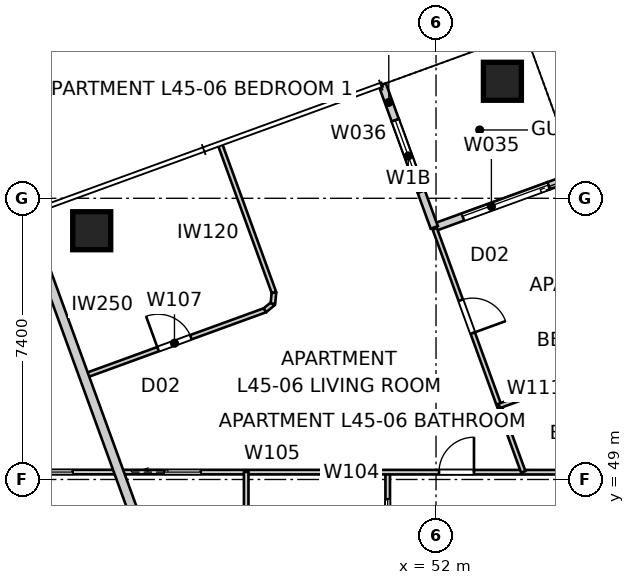
"""IFC4 building model, lengths in metres.
Left out: names, types, materials, properties, quantities, classifications, styles, units other than length and angle.
Written with IfcOpenShell. Run it as: python <this file> out.ifc"""

import sys

from ifc_helpers import new_model, si_unit, direction, frame, frame_2d, origin, origin_2d, place, context, subcontext, project, spatial, rectangle, extrude, element, fill, save


model = new_model("IFC4")
c1 = context("Model", 3, precision=1e-05, world=origin(), true_north=direction((0.0, 1.0)))
c2 = subcontext(c1, "Body", "Model", "MODEL_VIEW")
j1 = project(units=[si_unit("LENGTHUNIT", "METRE"), si_unit("PLANEANGLEUNIT", "RADIAN")], contexts=[c1])
p1 = place(None, origin())
s1 = spatial("IfcSite", under=j1, at=p1, CompositionType="ELEMENT")
p2 = place(p1, origin())
s2 = spatial("IfcBuilding", under=s1, at=p2, CompositionType="ELEMENT")
p3 = place(p2, frame((0.0, 0.0, 164.2)))
s3 = spatial("IfcBuildingStorey", under=s2, at=p3, CompositionType="ELEMENT", Elevation=164.2)
for number, where, z_axis, x_axis in (
    (1, (53.747, 59.479, 0.0), (0.0, 0.0, 1.0), (1.0, 0.0, 0.0)),
    (2, (42.94, 55.546, 0.0), (0.0, 0.0, 1.0), (1.0, 0.0, 0.0)),
):
    element("IfcColumn", number, at=place(p3, frame(where, z_axis=z_axis, x_axis=x_axis)), inside=s3, PredefinedType="COLUMN", context=c2, shape_type="SweptSolid", body=[
        extrude(rectangle(XDim=1.0, YDim=1.0, at=origin_2d()), origin(), (0.0, 0.0, 1.0), 3.4),
    ])
p4 = place(p3, frame((55.712, 57.002, 0.0), z_axis=(0.0, 0.0, 1.0), x_axis=(-0.939659694648, -0.342110593602, 0.0)))
e3 = element("IfcWall", 3, at=p4, inside=s3, PredefinedType="SOLIDWALL", context=c2, shape_type="SweptSolid", body=[
    extrude(rectangle(XDim=0.8, YDim=0.2, at=frame_2d((0.4, 0.0))), origin(), (0.0, 0.0, 1.0), 3.25),
])
p5 = place(p3, frame((54.96, 56.729, 0.0), z_axis=(0.0, 0.0, 1.0), x_axis=(-0.939693144909, -0.342018703306, 0.0)))
e4 = element("IfcWall", 4, at=p5, inside=s3, PredefinedType="SOLIDWALL", context=c2, shape_type="SweptSolid", body=[
    extrude(rectangle(XDim=3.2, YDim=0.2, at=frame_2d((1.6, 0.0))), origin(), (0.0, 0.0, 1.0), 2.722),
])
p6 = place(p5, origin())
e5 = element("IfcOpeningElement", 5, at=p6, cuts=e4, PredefinedType="OPENING", context=c2, shape_type="SweptSolid", body=[
    extrude(rectangle(XDim=2.4, YDim=2.1, at=frame_2d((1.2, 1.05))), frame((0.0, 0.11, 0.0), z_axis=(0.0, -1.0, 0.0), x_axis=(1.0, 0.0, 0.0)), (0.0, 0.0, 1.0), 0.22),
])
p7 = place(p3, frame((51.953, 55.634, 0.0), z_axis=(0.0, 0.0, 1.0), x_axis=(-0.341965219194, 0.939712609717, 0.0)))
e6 = element("IfcWall", 6, at=p7, inside=s3, PredefinedType="SOLIDWALL", context=c2, shape_type="SweptSolid", body=[
    extrude(rectangle(XDim=3.0, YDim=0.2, at=frame_2d((1.5, 0.0))), origin(), (0.0, 0.0, 1.0), 2.722),
])
p8 = place(p7, frame((1.0, 0.0, 0.45)))
e7 = element("IfcOpeningElement", 7, at=p8, cuts=e6, PredefinedType="OPENING", context=c2, shape_type="SweptSolid", body=[
    extrude(rectangle(XDim=2.0, YDim=1.8, at=frame_2d((1.0, 0.9))), frame((0.0, 0.11, 0.0), z_axis=(0.0, -1.0, 0.0), x_axis=(1.0, 0.0, 0.0)), (0.0, 0.0, 1.0), 0.22),
])
p9 = place(p3, frame((50.927, 58.453, 0.0), z_axis=(0.0, 0.0, 1.0), x_axis=(-0.342037080957, 0.939686455819, 0.0)))
e8 = element("IfcWall", 8, at=p9, inside=s3, PredefinedType="SOLIDWALL", context=c2, shape_type="SweptSolid", body=[
    extrude(rectangle(XDim=1.0, YDim=0.2, at=frame_2d((0.5, 0.0))), origin(), (0.0, 0.0, 1.0), 3.25),
])
p10 = place(p3, frame((41.188, 55.973, 0.0), z_axis=(0.0, 0.0, 1.0), x_axis=(0.342010282049, -0.939696209938, 0.0)))
e9 = element("IfcWall", 9, at=p10, inside=s3, PredefinedType="PARTITIONING", context=c2, shape_type="SweptSolid", body=[
    extrude(rectangle(XDim=9.756, YDim=0.25, at=frame_2d((4.878, 0.0))), origin(), (0.0, 0.0, 1.0), 3.25),
])
p11 = place(p3, frame((50.729, 46.8, 0.0), z_axis=(0.0, 0.0, 1.0), x_axis=(0.0, 1.0, 0.0)))
e10 = element("IfcWall", 10, at=p11, inside=s3, PredefinedType="PARTITIONING", context=c2, shape_type="SweptSolid", body=[
    extrude(rectangle(XDim=2.4, YDim=0.12, at=frame_2d((1.2, 0.0))), origin(), (0.0, 0.0, 1.0), 3.25),
])
p12 = place(p11, frame((0.72, 0.0, 0.0)))
e11 = element("IfcOpeningElement", 11, at=p12, cuts=e10, PredefinedType="OPENING", context=c2, shape_type="SweptSolid", body=[
    extrude(rectangle(XDim=0.96, YDim=2.1, at=frame_2d((0.48, 1.05))), frame((0.0, 0.07, 0.0), z_axis=(0.0, -1.0, 0.0), x_axis=(1.0, 0.0, 0.0)), (0.0, 0.0, 1.0), 0.14),
])
p13 = place(p3, frame((27.691, 49.2, 0.0), z_axis=(0.0, 0.0, 1.0), x_axis=(0.999999952285, -0.000308918217, 0.0)))
e12 = element("IfcWall", 12, at=p13, inside=s3, PredefinedType="PARTITIONING", context=c2, shape_type="SweptSolid", body=[
    extrude(rectangle(XDim=30.822, YDim=0.12, at=frame_2d((15.411, 0.0))), origin(), (0.0, 0.0, 1.0), 3.25),
])
p14 = place(p13, frame((5.882, 0.0, 0.0)))
e13 = element("IfcOpeningElement", 13, at=p14, cuts=e12, PredefinedType="OPENING", context=c2, shape_type="SweptSolid", body=[
    extrude(rectangle(XDim=0.92, YDim=2.34, at=frame_2d((0.46, 1.17))), frame((0.0, 0.07, 0.0), z_axis=(0.0, -1.0, 0.0), x_axis=(1.0, 0.0, 0.0)), (0.0, 0.0, 1.0), 0.14),
])
p15 = place(p13, frame((28.07, 0.0, 0.0)))
e14 = element("IfcOpeningElement", 14, at=p15, cuts=e12, PredefinedType="OPENING", context=c2, shape_type="SweptSolid", body=[
    extrude(rectangle(XDim=0.92, YDim=2.34, at=frame_2d((0.46, 1.17))), frame((0.0, 0.07, 0.0), z_axis=(0.0, -1.0, 0.0), x_axis=(1.0, 0.0, 0.0)), (0.0, 0.0, 1.0), 0.14),
])
p16 = place(p13, frame((24.388, 0.0, 0.0)))
e15 = element("IfcOpeningElement", 15, at=p16, cuts=e12, PredefinedType="OPENING", context=c2, shape_type="SweptSolid", body=[
    extrude(rectangle(XDim=0.92, YDim=2.34, at=frame_2d((0.46, 1.17))), frame((0.0, 0.07, 0.0), z_axis=(0.0, -1.0, 0.0), x_axis=(1.0, 0.0, 0.0)), (0.0, 0.0, 1.0), 0.14),
])
p17 = place(p13, frame((1.506, 0.0, 0.0)))
e16 = element("IfcOpeningElement", 16, at=p17, cuts=e12, PredefinedType="OPENING", context=c2, shape_type="SweptSolid", body=[
    extrude(rectangle(XDim=0.96, YDim=2.1, at=frame_2d((0.48, 1.05))), frame((0.0, 0.07, 0.0), z_axis=(0.0, -1.0, 0.0), x_axis=(1.0, 0.0, 0.0)), (0.0, 0.0, 1.0), 0.14),
])
p18 = place(p13, frame((17.158, 0.0, 0.0)))
e17 = element("IfcOpeningElement", 17, at=p18, cuts=e12, PredefinedType="OPENING", context=c2, shape_type="SweptSolid", body=[
    extrude(rectangle(XDim=0.96, YDim=2.1, at=frame_2d((0.48, 1.05))), frame((0.0, 0.07, 0.0), z_axis=(0.0, -1.0, 0.0), x_axis=(1.0, 0.0, 0.0)), (0.0, 0.0, 1.0), 0.14),
])
p19 = place(p13, frame((9.026, 0.0, 0.0)))
e18 = element("IfcOpeningElement", 18, at=p19, cuts=e12, PredefinedType="OPENING", context=c2, shape_type="SweptSolid", body=[
    extrude(rectangle(XDim=0.96, YDim=2.1, at=frame_2d((0.48, 1.05))), frame((0.0, 0.07, 0.0), z_axis=(0.0, -1.0, 0.0), x_axis=(1.0, 0.0, 0.0)), (0.0, 0.0, 1.0), 0.14),
])
p20 = place(p13, frame((13.788, 0.0, 0.0)))
e19 = element("IfcOpeningElement", 19, at=p20, cuts=e12, PredefinedType="OPENING", context=c2, shape_type="SweptSolid", body=[
    extrude(rectangle(XDim=0.96, YDim=2.1, at=frame_2d((0.48, 1.05))), frame((0.0, 0.07, 0.0), z_axis=(0.0, -1.0, 0.0), x_axis=(1.0, 0.0, 0.0)), (0.0, 0.0, 1.0), 0.14),
])
p21 = place(p3, frame((47.005, 46.8, 0.0), z_axis=(0.0, 0.0, 1.0), x_axis=(0.0, 1.0, 0.0)))
e20 = element("IfcWall", 20, at=p21, inside=s3, PredefinedType="PARTITIONING", context=c2, shape_type="SweptSolid", body=[
    extrude(rectangle(XDim=2.4, YDim=0.12, at=frame_2d((1.2, 0.0))), origin(), (0.0, 0.0, 1.0), 3.25),
])
p22 = place(p3, frame((42.736, 51.72, 0.0), z_axis=(0.0, 0.0, 1.0), x_axis=(0.939707596988, 0.341978993747, 0.0)))
e21 = element("IfcWall", 21, at=p22, inside=s3, PredefinedType="PARTITIONING", context=c2, shape_type="SweptSolid", body=[
    extrude(rectangle(XDim=5.068, YDim=0.12, at=frame_2d((2.534, 0.0))), origin(), (0.0, 0.0, 1.0), 3.25),
])
p23 = place(p22, frame((2.074, 0.0, 0.0)))
e22 = element("IfcOpeningElement", 22, at=p23, cuts=e21, PredefinedType="OPENING", context=c2, shape_type="SweptSolid", body=[
    extrude(rectangle(XDim=0.92, YDim=2.34, at=frame_2d((0.46, 1.17))), frame((0.0, 0.07, 0.0), z_axis=(0.0, -1.0, 0.0), x_axis=(1.0, 0.0, 0.0)), (0.0, 0.0, 1.0), 0.14),
])
p24 = place(p3, frame((47.499, 53.453, 0.0), z_axis=(0.0, 0.0, 1.0), x_axis=(0.769326440299, 0.638855874401, 0.0)))
e23 = element("IfcWall", 23, at=p24, inside=s3, PredefinedType="PARTITIONING", context=c2, shape_type="SweptSolid", body=[
    extrude(rectangle(XDim=0.271, YDim=0.12, at=frame_2d((0.136, 0.0))), origin(), (0.0, 0.0, 1.0), 3.25),
])
p25 = place(p3, frame((47.708, 53.627, 0.0), z_axis=(0.0, 0.0, 1.0), x_axis=(0.092395121176, 0.995722421955, 0.0)))
e24 = element("IfcWall", 24, at=p25, inside=s3, PredefinedType="PARTITIONING", context=c2, shape_type="SweptSolid", body=[
    extrude(rectangle(XDim=0.296, YDim=0.12, at=frame_2d((0.148, 0.0))), origin(), (0.0, 0.0, 1.0), 3.25),
])
p26 = place(p3, frame((47.735, 53.921, 0.0), z_axis=(0.0, 0.0, 1.0), x_axis=(-0.342004304159, 0.93969838562, 0.0)))
e25 = element("IfcWall", 25, at=p26, inside=s3, PredefinedType="PARTITIONING", context=c2, shape_type="SweptSolid", body=[
    extrude(rectangle(XDim=4.127, YDim=0.12, at=frame_2d((2.063, 0.0))), origin(), (0.0, 0.0, 1.0), 3.25),
])
p27 = place(p3, frame((51.967, 55.597, 0.0), z_axis=(0.0, 0.0, 1.0), x_axis=(0.342039648023, -0.939685521427, 0.0)))
e26 = element("IfcWall", 26, at=p27, inside=s3, PredefinedType="PARTITIONING", context=c2, shape_type="SweptSolid", body=[
    extrude(rectangle(XDim=6.807, YDim=0.12, at=frame_2d((3.404, 0.0))), origin(), (0.0, 0.0, 1.0), 3.25),
])
p28 = place(p27, frame((2.0, 0.0, 0.0)))
e27 = element("IfcOpeningElement", 27, at=p28, cuts=e26, PredefinedType="OPENING", context=c2, shape_type="SweptSolid", body=[
    extrude(rectangle(XDim=0.92, YDim=2.34, at=frame_2d((0.46, 1.17))), frame((0.0, 0.07, 0.0), z_axis=(0.0, -1.0, 0.0), x_axis=(1.0, 0.0, 0.0)), (0.0, 0.0, 1.0), 0.14),
])
p29 = place(p3, frame((57.385, 52.29, 0.0), z_axis=(0.0, 0.0, 1.0), x_axis=(-0.939685374709, -0.342040051101, 0.0)))
e28 = element("IfcWall", 28, at=p29, inside=s3, PredefinedType="PARTITIONING", context=c2, shape_type="SweptSolid", body=[
    extrude(rectangle(XDim=3.96, YDim=0.12, at=frame_2d((1.98, 0.0))), origin(), (0.0, 0.0, 1.0), 3.25),
])
p30 = place(p6, origin())
e29 = element("IfcDoor", 29, at=p30, inside=s3, OperationType="SLIDING_TO_LEFT", PredefinedType="DOOR", context=c2, shape_type="SweptSolid", body=[
    extrude(rectangle(XDim=2.4, YDim=2.1, at=frame_2d((1.2, 1.05))), frame((0.0, 0.025, 0.0), z_axis=(0.0, -1.0, 0.0), x_axis=(1.0, 0.0, 0.0)), (0.0, 0.0, 1.0), 0.05),
])
fill(e5, e29)
p31 = place(p8, origin())
e30 = element("IfcWindow", 30, at=p31, inside=s3, PartitioningType="SINGLE_PANEL", PredefinedType="WINDOW", context=c2, shape_type="SweptSolid", body=[
    extrude(rectangle(XDim=2.0, YDim=1.8, at=frame_2d((1.0, 0.9))), frame((0.0, 0.03, 0.0), z_axis=(0.0, -1.0, 0.0), x_axis=(1.0, 0.0, 0.0)), (0.0, 0.0, 1.0), 0.06),
])
fill(e7, e30)
p32 = place(p16, origin())
e31 = element("IfcDoor", 31, at=p32, inside=s3, OperationType="SINGLE_SWING_RIGHT", PredefinedType="DOOR", context=c2, shape_type="SweptSolid", body=[
    extrude(rectangle(XDim=0.92, YDim=2.34, at=frame_2d((0.46, 1.17))), frame((0.0, 0.025, 0.0), z_axis=(0.0, -1.0, 0.0), x_axis=(1.0, 0.0, 0.0)), (0.0, 0.0, 1.0), 0.05),
])
fill(e15, e31)
p33 = place(p12, origin())
e32 = element("IfcDoor", 32, at=p33, inside=s3, OperationType="SLIDING_TO_LEFT", PredefinedType="DOOR", context=c2, shape_type="SweptSolid", body=[
    extrude(rectangle(XDim=0.96, YDim=2.1, at=frame_2d((0.48, 1.05))), frame((0.0, 0.025, 0.0), z_axis=(0.0, -1.0, 0.0), x_axis=(1.0, 0.0, 0.0)), (0.0, 0.0, 1.0), 0.05),
])
fill(e11, e32)
p34 = place(p28, origin())
e33 = element("IfcDoor", 33, at=p34, inside=s3, OperationType="SINGLE_SWING_RIGHT", PredefinedType="DOOR", context=c2, shape_type="SweptSolid", body=[
    extrude(rectangle(XDim=0.92, YDim=2.34, at=frame_2d((0.46, 1.17))), frame((0.0, 0.025, 0.0), z_axis=(0.0, -1.0, 0.0), x_axis=(1.0, 0.0, 0.0)), (0.0, 0.0, 1.0), 0.05),
])
fill(e27, e33)
p35 = place(p23, origin())
e34 = element("IfcDoor", 34, at=p35, inside=s3, OperationType="SINGLE_SWING_LEFT", PredefinedType="DOOR", context=c2, shape_type="SweptSolid", body=[
    extrude(rectangle(XDim=0.92, YDim=2.34, at=frame_2d((0.46, 1.17))), frame((0.0, 0.025, 0.0), z_axis=(0.0, -1.0, 0.0), x_axis=(1.0, 0.0, 0.0)), (0.0, 0.0, 1.0), 0.05),
])
fill(e22, e34)
p36 = place(p18, origin())
e35 = element("IfcDoor", 35, at=p36, inside=s3, OperationType="SLIDING_TO_LEFT", PredefinedType="DOOR", context=c2, shape_type="SweptSolid", body=[
    extrude(rectangle(XDim=0.96, YDim=2.1, at=frame_2d((0.48, 1.05))), frame((0.0, 0.025, 0.0), z_axis=(0.0, -1.0, 0.0), x_axis=(1.0, 0.0, 0.0)), (0.0, 0.0, 1.0), 0.05),
])
fill(e17, e35)
p37 = place(p20, origin())
e36 = element("IfcDoor", 36, at=p37, inside=s3, OperationType="SLIDING_TO_LEFT", PredefinedType="DOOR", context=c2, shape_type="SweptSolid", body=[
    extrude(rectangle(XDim=0.96, YDim=2.1, at=frame_2d((0.48, 1.05))), frame((0.0, 0.025, 0.0), z_axis=(0.0, -1.0, 0.0), x_axis=(1.0, 0.0, 0.0)), (0.0, 0.0, 1.0), 0.05),
])
fill(e19, e36)
save(model, sys.argv[1])
